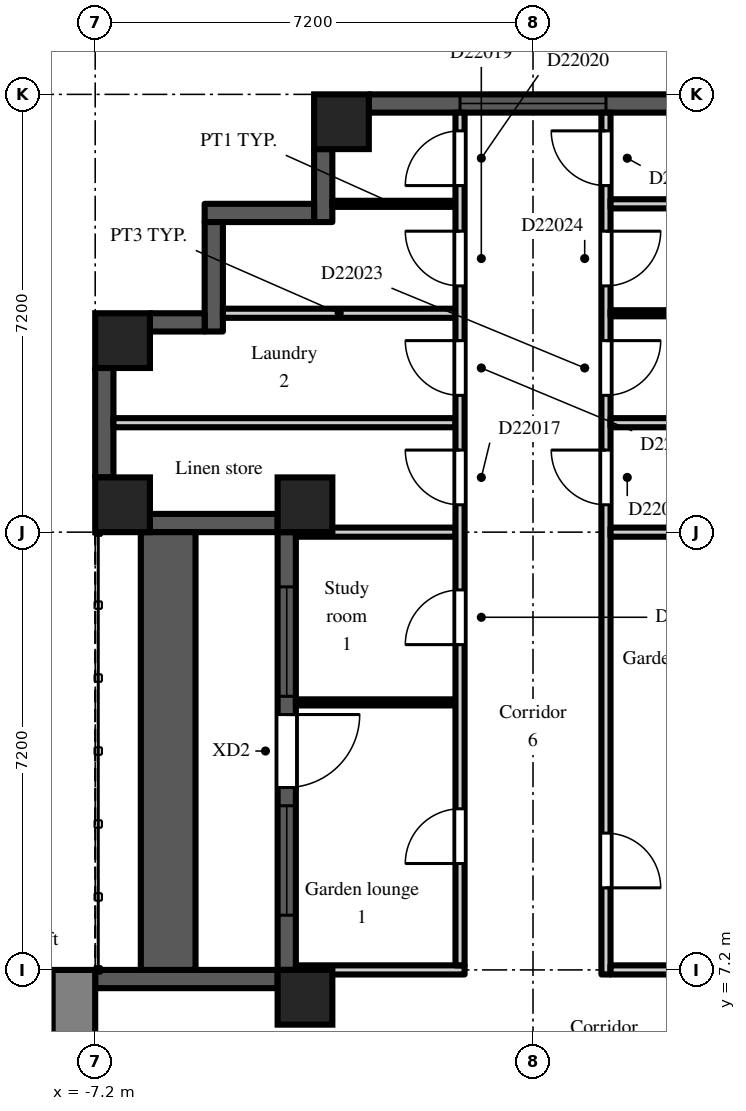
"""IFC4 building model, lengths in metres.
Left out: names, types, materials, properties, quantities, classifications, styles, units other than length and angle.
Written with IfcOpenShell. Run it as: python <this file> out.ifc"""

import sys

from ifc_helpers import new_model, si_unit, direction, frame, frame_2d, origin, origin_2d, place, context, subcontext, project, spatial, rectangle, extrude, element, fill, save


model = new_model("IFC4")
c1 = context("Model", 3, precision=1e-05, world=origin(), true_north=direction((0.0, 1.0)))
c2 = subcontext(c1, "Body", "Model", "MODEL_VIEW")
j1 = project(units=[si_unit("LENGTHUNIT", "METRE"), si_unit("PLANEANGLEUNIT", "RADIAN")], contexts=[c1])
p1 = place(None, origin())
s1 = spatial("IfcSite", under=j1, at=p1, CompositionType="ELEMENT")
p2 = place(p1, origin())
s2 = spatial("IfcBuilding", under=s1, at=p2, CompositionType="ELEMENT")
p3 = place(p2, frame((0.0, 0.0, 159.3)))
s3 = spatial("IfcBuildingStorey", under=s2, at=p3, CompositionType="ELEMENT", Elevation=159.3)
for number, where, z_axis, x_axis in (
    (1, (-6.75, 14.85, 0.0), (0.0, 0.0, 1.0), (1.0, 0.0, 0.0)),
    (2, (-6.75, 17.55, 0.0), (0.0, 0.0, 1.0), (1.0, 0.0, 0.0)),
    (3, (-3.75, 6.75, 0.0), (0.0, 0.0, 1.0), (1.0, 0.0, 0.0)),
    (4, (-3.75, 14.85, 0.0), (0.0, 0.0, 1.0), (1.0, 0.0, 0.0)),
    (5, (-3.15, 21.15, 0.0), (0.0, 0.0, 1.0), (1.0, 0.0, 0.0)),
):
    element("IfcColumn", number, at=place(p3, frame(where, z_axis=z_axis, x_axis=x_axis)), inside=s3, PredefinedType="COLUMN", context=c2, shape_type="SweptSolid", body=[
        extrude(rectangle(XDim=0.9, YDim=0.9, at=origin_2d()), origin(), (0.0, 0.0, 1.0), 3.0),
    ])
p4 = place(p3, frame((2.7, 21.45, 0.0), z_axis=(0.0, 0.0, 1.0), x_axis=(-1.0, 0.0, 0.0)))
e6 = element("IfcWall", 6, at=p4, inside=s3, PredefinedType="SOLIDWALL", context=c2, shape_type="SweptSolid", body=[
    extrude(rectangle(XDim=5.4, YDim=0.3, at=frame_2d((2.7, 0.0))), origin(), (0.0, 0.0, 1.0), 2.2),
])
p5 = place(p4, frame((1.5, 0.0, 0.2)))
e7 = element("IfcOpeningElement", 7, at=p5, cuts=e6, PredefinedType="OPENING", context=c2, shape_type="SweptSolid", body=[
    extrude(rectangle(XDim=2.4, YDim=1.85, at=frame_2d((1.2, 0.925))), frame((0.0, 0.16, 0.0), z_axis=(0.0, -1.0, 0.0), x_axis=(1.0, 0.0, 0.0)), (0.0, 0.0, 1.0), 0.32),
])
p6 = place(p3, frame((-3.45, 20.7, 0.0), z_axis=(0.0, 0.0, 1.0), x_axis=(0.0, -1.0, 0.0)))
e8 = element("IfcWall", 8, at=p6, inside=s3, PredefinedType="SOLIDWALL", context=c2, shape_type="SweptSolid", body=[
    extrude(rectangle(XDim=1.2, YDim=0.3, at=frame_2d((0.6, 0.0))), origin(), (0.0, 0.0, 1.0), 2.55),
])
p7 = place(p3, frame((-3.6, 19.65, 0.0), z_axis=(0.0, 0.0, 1.0), x_axis=(-1.0, 0.0, 0.0)))
e9 = element("IfcWall", 9, at=p7, inside=s3, PredefinedType="SOLIDWALL", context=c2, shape_type="SweptSolid", body=[
    extrude(rectangle(XDim=1.8, YDim=0.3, at=frame_2d((0.9, 0.0))), origin(), (0.0, 0.0, 1.0), 2.55),
])
p8 = place(p3, frame((-5.25, 19.5, 0.0), z_axis=(0.0, 0.0, 1.0), x_axis=(0.0, -1.0, 0.0)))
e10 = element("IfcWall", 10, at=p8, inside=s3, PredefinedType="SOLIDWALL", context=c2, shape_type="SweptSolid", body=[
    extrude(rectangle(XDim=1.8, YDim=0.3, at=frame_2d((0.9, 0.0))), origin(), (0.0, 0.0, 1.0), 2.55),
])
p9 = place(p3, frame((-5.4, 17.85, 0.0), z_axis=(0.0, 0.0, 1.0), x_axis=(-1.0, 0.0, 0.0)))
e11 = element("IfcWall", 11, at=p9, inside=s3, PredefinedType="SOLIDWALL", context=c2, shape_type="SweptSolid", body=[
    extrude(rectangle(XDim=0.9, YDim=0.3, at=frame_2d((0.45, 0.0))), origin(), (0.0, 0.0, 1.0), 2.55),
])
p10 = place(p3, frame((-7.05, 17.1, 0.0), z_axis=(0.0, 0.0, 1.0), x_axis=(0.0, -1.0, 0.0)))
e12 = element("IfcWall", 12, at=p10, inside=s3, PredefinedType="SOLIDWALL", context=c2, shape_type="SweptSolid", body=[
    extrude(rectangle(XDim=1.8, YDim=0.3, at=frame_2d((0.9, 0.0))), origin(), (0.0, 0.0, 1.0), 2.2),
])
p11 = place(p3, frame((-6.3, 14.55, 0.0), z_axis=(0.0, 0.0, 1.0), x_axis=(1.0, 0.0, 0.0)))
e13 = element("IfcWall", 13, at=p11, inside=s3, PredefinedType="SOLIDWALL", context=c2, shape_type="SweptSolid", body=[
    extrude(rectangle(XDim=2.1, YDim=0.3, at=frame_2d((1.05, 0.0))), origin(), (0.0, 0.0, 1.0), 2.55),
])
p12 = place(p3, frame((-4.05, 14.4, 0.0), z_axis=(0.0, 0.0, 1.0), x_axis=(0.0, -1.0, 0.0)))
e14 = element("IfcWall", 14, at=p12, inside=s3, PredefinedType="SOLIDWALL", context=c2, shape_type="SweptSolid", body=[
    extrude(rectangle(XDim=7.2, YDim=0.3, at=frame_2d((3.6, 0.0))), origin(), (0.0, 0.0, 1.0), 2.55),
])
p13 = place(p12, frame((3.0, 0.0, 0.0)))
e15 = element("IfcOpeningElement", 15, at=p13, cuts=e14, PredefinedType="OPENING", context=c2, shape_type="SweptSolid", body=[
    extrude(rectangle(XDim=1.2, YDim=2.05, at=frame_2d((0.6, 1.025))), frame((0.0, 0.16, 0.0), z_axis=(0.0, -1.0, 0.0), x_axis=(1.0, 0.0, 0.0)), (0.0, 0.0, 1.0), 0.32),
])
p14 = place(p12, frame((0.9, 0.0, 0.2)))
e16 = element("IfcOpeningElement", 16, at=p14, cuts=e14, PredefinedType="OPENING", context=c2, shape_type="SweptSolid", body=[
    extrude(rectangle(XDim=1.8, YDim=1.85, at=frame_2d((0.9, 0.925))), frame((0.0, 0.16, 0.0), z_axis=(0.0, -1.0, 0.0), x_axis=(1.0, 0.0, 0.0)), (0.0, 0.0, 1.0), 0.32),
])
p15 = place(p12, frame((4.5, 0.0, 0.2)))
e17 = element("IfcOpeningElement", 17, at=p15, cuts=e14, PredefinedType="OPENING", context=c2, shape_type="SweptSolid", body=[
    extrude(rectangle(XDim=1.8, YDim=1.85, at=frame_2d((0.9, 0.925))), frame((0.0, 0.16, 0.0), z_axis=(0.0, -1.0, 0.0), x_axis=(1.0, 0.0, 0.0)), (0.0, 0.0, 1.0), 0.32),
])
p16 = place(p3, frame((-4.2, 7.05, 0.0), z_axis=(0.0, 0.0, 1.0), x_axis=(-1.0, 0.0, 0.0)))
e18 = element("IfcWall", 18, at=p16, inside=s3, PredefinedType="SOLIDWALL", context=c2, shape_type="SweptSolid", body=[
    extrude(rectangle(XDim=3.0, YDim=0.3, at=frame_2d((1.5, 0.0))), origin(), (0.0, 0.0, 1.0), 2.55),
])
p17 = place(p3, frame((-6.0, 7.2, 0.0), z_axis=(0.0, 0.0, 1.0), x_axis=(0.0, 1.0, 0.0)))
e19 = element("IfcWall", 19, at=p17, inside=s3, PredefinedType="PARAPET", context=c2, shape_type="SweptSolid", body=[
    extrude(rectangle(XDim=7.2, YDim=0.9, at=frame_2d((3.6, 0.0))), origin(), (0.0, 0.0, 1.0), 0.8),
])
p18 = place(p3, frame((-7.55, -7.2, 0.0), z_axis=(0.0, 0.0, 1.0), x_axis=(0.0, 1.0, 0.0)))
e20 = element("IfcWall", 20, at=p18, inside=s3, PredefinedType="SHEAR", context=c2, shape_type="SweptSolid", body=[
    extrude(rectangle(XDim=14.4, YDim=0.7, at=frame_2d((7.2, 0.0))), origin(), (0.0, 0.0, 1.0), 2.55),
])
p19 = place(p18, frame((6.0, 0.0, 0.0)))
e21 = element("IfcOpeningElement", 21, at=p19, cuts=e20, PredefinedType="OPENING", context=c2, shape_type="SweptSolid", body=[
    extrude(rectangle(XDim=2.4, YDim=2.2, at=frame_2d((1.2, 1.1))), frame((0.0, 0.36, 0.0), z_axis=(0.0, -1.0, 0.0), x_axis=(1.0, 0.0, 0.0)), (0.0, 0.0, 1.0), 0.72),
])
p20 = place(p3, frame((-6.9, 16.2, 0.0), z_axis=(0.0, 0.0, 1.0), x_axis=(1.0, 0.0, 0.0)))
e22 = element("IfcWall", 22, at=p20, inside=s3, PredefinedType="PARTITIONING", context=c2, shape_type="SweptSolid", body=[
    extrude(rectangle(XDim=5.625, YDim=0.15, at=frame_2d((2.812, 0.0))), origin(), (0.0, 0.0, 1.0), 2.55),
])
p21 = place(p3, frame((-5.1, 18.0, 0.0), z_axis=(0.0, 0.0, 1.0), x_axis=(1.0, 0.0, 0.0)))
e23 = element("IfcWall", 23, at=p21, inside=s3, PredefinedType="PARTITIONING", context=c2, shape_type="SweptSolid", body=[
    extrude(rectangle(XDim=3.825, YDim=0.15, at=frame_2d((1.913, 0.0))), origin(), (0.0, 0.0, 1.0), 2.55),
])
p22 = place(p3, frame((-3.9, 7.2, 0.0), z_axis=(0.0, 0.0, 1.0), x_axis=(1.0, 0.0, 0.0)))
e24 = element("IfcWall", 24, at=p22, inside=s3, PredefinedType="PARTITIONING", context=c2, shape_type="SweptSolid", body=[
    extrude(rectangle(XDim=2.775, YDim=0.15, at=frame_2d((1.387, 0.0))), origin(), (0.0, 0.0, 1.0), 2.55),
])
p23 = place(p3, frame((-3.9, 11.6, 0.0), z_axis=(0.0, 0.0, 1.0), x_axis=(1.0, 0.0, 0.0)))
e25 = element("IfcWall", 25, at=p23, inside=s3, PredefinedType="PARTITIONING", context=c2, shape_type="SweptSolid", body=[
    extrude(rectangle(XDim=2.625, YDim=0.1, at=frame_2d((1.312, 0.0))), origin(), (0.0, 0.0, 1.0), 2.55),
])
p24 = place(p3, frame((-3.9, 14.4, 0.0), z_axis=(0.0, 0.0, 1.0), x_axis=(1.0, 0.0, 0.0)))
e26 = element("IfcWall", 26, at=p24, inside=s3, PredefinedType="PARTITIONING", context=c2, shape_type="SweptSolid", body=[
    extrude(rectangle(XDim=2.625, YDim=0.15, at=frame_2d((1.312, 0.0))), origin(), (0.0, 0.0, 1.0), 2.55),
])
p25 = place(p3, frame((-3.3, 19.8, 0.0), z_axis=(0.0, 0.0, 1.0), x_axis=(1.0, 0.0, 0.0)))
e27 = element("IfcWall", 27, at=p25, inside=s3, PredefinedType="PARTITIONING", context=c2, shape_type="SweptSolid", body=[
    extrude(rectangle(XDim=2.025, YDim=0.1, at=frame_2d((1.013, 0.0))), origin(), (0.0, 0.0, 1.0), 2.55),
])
p26 = place(p3, frame((-1.2, 7.275, 0.0), z_axis=(0.0, 0.0, 1.0), x_axis=(0.0, 1.0, 0.0)))
e28 = element("IfcWall", 28, at=p26, inside=s3, PredefinedType="PARTITIONING", context=c2, shape_type="SweptSolid", body=[
    extrude(rectangle(XDim=14.025, YDim=0.15, at=frame_2d((7.013, 0.0))), origin(), (0.0, 0.0, 1.0), 2.55),
])
p27 = place(p26, frame((5.275, 0.0, 0.0)))
e29 = element("IfcOpeningElement", 29, at=p27, cuts=e28, PredefinedType="OPENING", context=c2, shape_type="SweptSolid", body=[
    extrude(rectangle(XDim=0.9, YDim=2.1, at=frame_2d((0.45, 1.05))), frame((0.0, 0.085, 0.0), z_axis=(0.0, -1.0, 0.0), x_axis=(1.0, 0.0, 0.0)), (0.0, 0.0, 1.0), 0.17),
])
p28 = place(p26, frame((1.675, 0.0, 0.0)))
e30 = element("IfcOpeningElement", 30, at=p28, cuts=e28, PredefinedType="OPENING", context=c2, shape_type="SweptSolid", body=[
    extrude(rectangle(XDim=0.9, YDim=2.1, at=frame_2d((0.45, 1.05))), frame((0.0, 0.085, 0.0), z_axis=(0.0, -1.0, 0.0), x_axis=(1.0, 0.0, 0.0)), (0.0, 0.0, 1.0), 0.17),
])
p29 = place(p26, frame((7.575, 0.0, 0.0)))
e31 = element("IfcOpeningElement", 31, at=p29, cuts=e28, PredefinedType="OPENING", context=c2, shape_type="SweptSolid", body=[
    extrude(rectangle(XDim=0.9, YDim=2.1, at=frame_2d((0.45, 1.05))), frame((0.0, 0.085, 0.0), z_axis=(0.0, -1.0, 0.0), x_axis=(1.0, 0.0, 0.0)), (0.0, 0.0, 1.0), 0.17),
])
p30 = place(p26, frame((9.375, 0.0, 0.0)))
e32 = element("IfcOpeningElement", 32, at=p30, cuts=e28, PredefinedType="OPENING", context=c2, shape_type="SweptSolid", body=[
    extrude(rectangle(XDim=0.9, YDim=2.1, at=frame_2d((0.45, 1.05))), frame((0.0, 0.085, 0.0), z_axis=(0.0, -1.0, 0.0), x_axis=(1.0, 0.0, 0.0)), (0.0, 0.0, 1.0), 0.17),
])
p31 = place(p26, frame((11.175, 0.0, 0.0)))
e33 = element("IfcOpeningElement", 33, at=p31, cuts=e28, PredefinedType="OPENING", context=c2, shape_type="SweptSolid", body=[
    extrude(rectangle(XDim=0.9, YDim=2.1, at=frame_2d((0.45, 1.05))), frame((0.0, 0.085, 0.0), z_axis=(0.0, -1.0, 0.0), x_axis=(1.0, 0.0, 0.0)), (0.0, 0.0, 1.0), 0.17),
])
p32 = place(p26, frame((12.825, 0.0, 0.0)))
e34 = element("IfcOpeningElement", 34, at=p32, cuts=e28, PredefinedType="OPENING", context=c2, shape_type="SweptSolid", body=[
    extrude(rectangle(XDim=0.9, YDim=2.1, at=frame_2d((0.45, 1.05))), frame((0.0, 0.085, 0.0), z_axis=(0.0, -1.0, 0.0), x_axis=(1.0, 0.0, 0.0)), (0.0, 0.0, 1.0), 0.17),
])
p33 = place(p3, frame((1.2, 7.125, 0.0), z_axis=(0.0, 0.0, 1.0), x_axis=(0.0, 1.0, 0.0)))
e35 = element("IfcWall", 35, at=p33, inside=s3, PredefinedType="PARTITIONING", context=c2, shape_type="SweptSolid", body=[
    extrude(rectangle(XDim=14.175, YDim=0.15, at=frame_2d((7.087, 0.0))), origin(), (0.0, 0.0, 1.0), 2.55),
])
p34 = place(p33, frame((1.425, 0.0, 0.0)))
e36 = element("IfcOpeningElement", 36, at=p34, cuts=e35, PredefinedType="OPENING", context=c2, shape_type="SweptSolid", body=[
    extrude(rectangle(XDim=0.9, YDim=2.1, at=frame_2d((0.45, 1.05))), frame((0.0, 0.085, 0.0), z_axis=(0.0, -1.0, 0.0), x_axis=(1.0, 0.0, 0.0)), (0.0, 0.0, 1.0), 0.17),
])
p35 = place(p33, frame((7.725, 0.0, 0.0)))
e37 = element("IfcOpeningElement", 37, at=p35, cuts=e35, PredefinedType="OPENING", context=c2, shape_type="SweptSolid", body=[
    extrude(rectangle(XDim=0.9, YDim=2.1, at=frame_2d((0.45, 1.05))), frame((0.0, 0.085, 0.0), z_axis=(0.0, -1.0, 0.0), x_axis=(1.0, 0.0, 0.0)), (0.0, 0.0, 1.0), 0.17),
])
p36 = place(p33, frame((9.525, 0.0, 0.0)))
e38 = element("IfcOpeningElement", 38, at=p36, cuts=e35, PredefinedType="OPENING", context=c2, shape_type="SweptSolid", body=[
    extrude(rectangle(XDim=0.9, YDim=2.1, at=frame_2d((0.45, 1.05))), frame((0.0, 0.085, 0.0), z_axis=(0.0, -1.0, 0.0), x_axis=(1.0, 0.0, 0.0)), (0.0, 0.0, 1.0), 0.17),
])
p37 = place(p33, frame((11.325, 0.0, 0.0)))
e39 = element("IfcOpeningElement", 39, at=p37, cuts=e35, PredefinedType="OPENING", context=c2, shape_type="SweptSolid", body=[
    extrude(rectangle(XDim=0.9, YDim=2.1, at=frame_2d((0.45, 1.05))), frame((0.0, 0.085, 0.0), z_axis=(0.0, -1.0, 0.0), x_axis=(1.0, 0.0, 0.0)), (0.0, 0.0, 1.0), 0.17),
])
p38 = place(p33, frame((12.975, 0.0, 0.0)))
e40 = element("IfcOpeningElement", 40, at=p38, cuts=e35, PredefinedType="OPENING", context=c2, shape_type="SweptSolid", body=[
    extrude(rectangle(XDim=0.9, YDim=2.1, at=frame_2d((0.45, 1.05))), frame((0.0, 0.085, 0.0), z_axis=(0.0, -1.0, 0.0), x_axis=(1.0, 0.0, 0.0)), (0.0, 0.0, 1.0), 0.17),
])
for number, where, z_axis, x_axis in (
    (41, (1.275, 7.2, 0.0), (0.0, 0.0, 1.0), (1.0, 0.0, 0.0)),
    (42, (1.275, 14.4, 0.0), (0.0, 0.0, 1.0), (1.0, 0.0, 0.0)),
):
    element("IfcWall", number, at=place(p3, frame(where, z_axis=z_axis, x_axis=x_axis)), inside=s3, PredefinedType="PARTITIONING", context=c2, shape_type="SweptSolid", body=[
        extrude(rectangle(XDim=2.625, YDim=0.15, at=frame_2d((1.312, 0.0))), origin(), (0.0, 0.0, 1.0), 2.55),
    ])
p39 = place(p3, frame((1.275, 16.2, 0.0), z_axis=(0.0, 0.0, 1.0), x_axis=(1.0, 0.0, 0.0)))
e43 = element("IfcWall", 43, at=p39, inside=s3, PredefinedType="PARTITIONING", context=c2, shape_type="SweptSolid", body=[
    extrude(rectangle(XDim=5.625, YDim=0.15, at=frame_2d((2.812, 0.0))), origin(), (0.0, 0.0, 1.0), 2.55),
])
p40 = place(p3, frame((1.275, 18.0, 0.0), z_axis=(0.0, 0.0, 1.0), x_axis=(1.0, 0.0, 0.0)))
e44 = element("IfcWall", 44, at=p40, inside=s3, PredefinedType="PARTITIONING", context=c2, shape_type="SweptSolid", body=[
    extrude(rectangle(XDim=3.825, YDim=0.1, at=frame_2d((1.913, 0.0))), origin(), (0.0, 0.0, 1.0), 2.55),
])
p41 = place(p3, frame((1.275, 19.8, 0.0), z_axis=(0.0, 0.0, 1.0), x_axis=(1.0, 0.0, 0.0)))
e45 = element("IfcWall", 45, at=p41, inside=s3, PredefinedType="PARTITIONING", context=c2, shape_type="SweptSolid", body=[
    extrude(rectangle(XDim=2.025, YDim=0.15, at=frame_2d((1.013, 0.0))), origin(), (0.0, 0.0, 1.0), 2.55),
])
p42 = place(p5, origin())
e46 = element("IfcWindow", 46, at=p42, inside=s3, PartitioningType="SINGLE_PANEL", PredefinedType="WINDOW", context=c2, shape_type="SweptSolid", body=[
    extrude(rectangle(XDim=2.4, YDim=1.85, at=frame_2d((1.2, 0.925))), frame((0.0, 0.03, 0.0), z_axis=(0.0, -1.0, 0.0), x_axis=(1.0, 0.0, 0.0)), (0.0, 0.0, 1.0), 0.06),
])
fill(e7, e46)
p43 = place(p13, origin())
e47 = element("IfcDoor", 47, at=p43, inside=s3, OperationType="SINGLE_SWING_LEFT", PredefinedType="DOOR", context=c2, shape_type="SweptSolid", body=[
    extrude(rectangle(XDim=1.2, YDim=2.05, at=frame_2d((0.6, 1.025))), frame((0.0, 0.025, 0.0), z_axis=(0.0, -1.0, 0.0), x_axis=(1.0, 0.0, 0.0)), (0.0, 0.0, 1.0), 0.05),
])
fill(e15, e47)
p44 = place(p14, origin())
e48 = element("IfcWindow", 48, at=p44, inside=s3, PartitioningType="SINGLE_PANEL", PredefinedType="WINDOW", context=c2, shape_type="SweptSolid", body=[
    extrude(rectangle(XDim=1.8, YDim=1.85, at=frame_2d((0.9, 0.925))), frame((0.0, 0.03, 0.0), z_axis=(0.0, -1.0, 0.0), x_axis=(1.0, 0.0, 0.0)), (0.0, 0.0, 1.0), 0.06),
])
fill(e16, e48)
p45 = place(p15, origin())
e49 = element("IfcWindow", 49, at=p45, inside=s3, PartitioningType="SINGLE_PANEL", PredefinedType="WINDOW", context=c2, shape_type="SweptSolid", body=[
    extrude(rectangle(XDim=1.8, YDim=1.85, at=frame_2d((0.9, 0.925))), frame((0.0, 0.03, 0.0), z_axis=(0.0, -1.0, 0.0), x_axis=(1.0, 0.0, 0.0)), (0.0, 0.0, 1.0), 0.06),
])
fill(e17, e49)
p46 = place(p27, origin())
e50 = element("IfcDoor", 50, at=p46, inside=s3, OperationType="SINGLE_SWING_LEFT", PredefinedType="DOOR", context=c2, shape_type="SweptSolid", body=[
    extrude(rectangle(XDim=0.9, YDim=2.1, at=frame_2d((0.45, 1.05))), frame((0.0, 0.025, 0.0), z_axis=(0.0, -1.0, 0.0), x_axis=(1.0, 0.0, 0.0)), (0.0, 0.0, 1.0), 0.05),
])
fill(e29, e50)
p47 = place(p28, origin())
e51 = element("IfcDoor", 51, at=p47, inside=s3, OperationType="SINGLE_SWING_LEFT", PredefinedType="DOOR", context=c2, shape_type="SweptSolid", body=[
    extrude(rectangle(XDim=0.9, YDim=2.1, at=frame_2d((0.45, 1.05))), frame((0.0, 0.025, 0.0), z_axis=(0.0, -1.0, 0.0), x_axis=(1.0, 0.0, 0.0)), (0.0, 0.0, 1.0), 0.05),
])
fill(e30, e51)
p48 = place(p29, origin())
e52 = element("IfcDoor", 52, at=p48, inside=s3, OperationType="SINGLE_SWING_RIGHT", PredefinedType="DOOR", context=c2, shape_type="SweptSolid", body=[
    extrude(rectangle(XDim=0.9, YDim=2.1, at=frame_2d((0.45, 1.05))), frame((0.0, 0.025, 0.0), z_axis=(0.0, -1.0, 0.0), x_axis=(1.0, 0.0, 0.0)), (0.0, 0.0, 1.0), 0.05),
])
fill(e31, e52)
p49 = place(p30, origin())
e53 = element("IfcDoor", 53, at=p49, inside=s3, OperationType="SINGLE_SWING_RIGHT", PredefinedType="DOOR", context=c2, shape_type="SweptSolid", body=[
    extrude(rectangle(XDim=0.9, YDim=2.1, at=frame_2d((0.45, 1.05))), frame((0.0, 0.025, 0.0), z_axis=(0.0, -1.0, 0.0), x_axis=(1.0, 0.0, 0.0)), (0.0, 0.0, 1.0), 0.05),
])
fill(e32, e53)
p50 = place(p31, origin())
e54 = element("IfcDoor", 54, at=p50, inside=s3, OperationType="SINGLE_SWING_RIGHT", PredefinedType="DOOR", context=c2, shape_type="SweptSolid", body=[
    extrude(rectangle(XDim=0.9, YDim=2.1, at=frame_2d((0.45, 1.05))), frame((0.0, 0.025, 0.0), z_axis=(0.0, -1.0, 0.0), x_axis=(1.0, 0.0, 0.0)), (0.0, 0.0, 1.0), 0.05),
])
fill(e33, e54)
p51 = place(p32, origin())
e55 = element("IfcDoor", 55, at=p51, inside=s3, OperationType="SINGLE_SWING_LEFT", PredefinedType="DOOR", context=c2, shape_type="SweptSolid", body=[
    extrude(rectangle(XDim=0.9, YDim=2.1, at=frame_2d((0.45, 1.05))), frame((0.0, 0.025, 0.0), z_axis=(0.0, -1.0, 0.0), x_axis=(1.0, 0.0, 0.0)), (0.0, 0.0, 1.0), 0.05),
])
fill(e34, e55)
p52 = place(p34, frame((0.9, 0.0, 0.0), z_axis=(0.0, 0.0, 1.0), x_axis=(-1.0, 0.0, 0.0)))
e56 = element("IfcDoor", 56, at=p52, inside=s3, OperationType="SINGLE_SWING_RIGHT", PredefinedType="DOOR", context=c2, shape_type="SweptSolid", body=[
    extrude(rectangle(XDim=0.9, YDim=2.1, at=frame_2d((0.45, 1.05))), frame((0.0, 0.025, 0.0), z_axis=(0.0, -1.0, 0.0), x_axis=(1.0, 0.0, 0.0)), (0.0, 0.0, 1.0), 0.05),
])
fill(e36, e56)
p53 = place(p35, origin())
e57 = element("IfcDoor", 57, at=p53, inside=s3, OperationType="SINGLE_SWING_RIGHT", PredefinedType="DOOR", context=c2, shape_type="SweptSolid", body=[
    extrude(rectangle(XDim=0.9, YDim=2.1, at=frame_2d((0.45, 1.05))), frame((0.0, 0.025, 0.0), z_axis=(0.0, -1.0, 0.0), x_axis=(1.0, 0.0, 0.0)), (0.0, 0.0, 1.0), 0.05),
])
fill(e37, e57)
p54 = place(p36, frame((0.9, 0.0, 0.0), z_axis=(0.0, 0.0, 1.0), x_axis=(-1.0, 0.0, 0.0)))
e58 = element("IfcDoor", 58, at=p54, inside=s3, OperationType="SINGLE_SWING_LEFT", PredefinedType="DOOR", context=c2, shape_type="SweptSolid", body=[
    extrude(rectangle(XDim=0.9, YDim=2.1, at=frame_2d((0.45, 1.05))), frame((0.0, 0.025, 0.0), z_axis=(0.0, -1.0, 0.0), x_axis=(1.0, 0.0, 0.0)), (0.0, 0.0, 1.0), 0.05),
])
fill(e38, e58)
p55 = place(p37, frame((0.9, 0.0, 0.0), z_axis=(0.0, 0.0, 1.0), x_axis=(-1.0, 0.0, 0.0)))
e59 = element("IfcDoor", 59, at=p55, inside=s3, OperationType="SINGLE_SWING_LEFT", PredefinedType="DOOR", context=c2, shape_type="SweptSolid", body=[
    extrude(rectangle(XDim=0.9, YDim=2.1, at=frame_2d((0.45, 1.05))), frame((0.0, 0.025, 0.0), z_axis=(0.0, -1.0, 0.0), x_axis=(1.0, 0.0, 0.0)), (0.0, 0.0, 1.0), 0.05),
])
fill(e39, e59)
p56 = place(p38, origin())
e60 = element("IfcDoor", 60, at=p56, inside=s3, OperationType="SINGLE_SWING_RIGHT", PredefinedType="DOOR", context=c2, shape_type="SweptSolid", body=[
    extrude(rectangle(XDim=0.9, YDim=2.1, at=frame_2d((0.45, 1.05))), frame((0.0, 0.025, 0.0), z_axis=(0.0, -1.0, 0.0), x_axis=(1.0, 0.0, 0.0)), (0.0, 0.0, 1.0), 0.05),
])
fill(e40, e60)
save(model, sys.argv[1])
